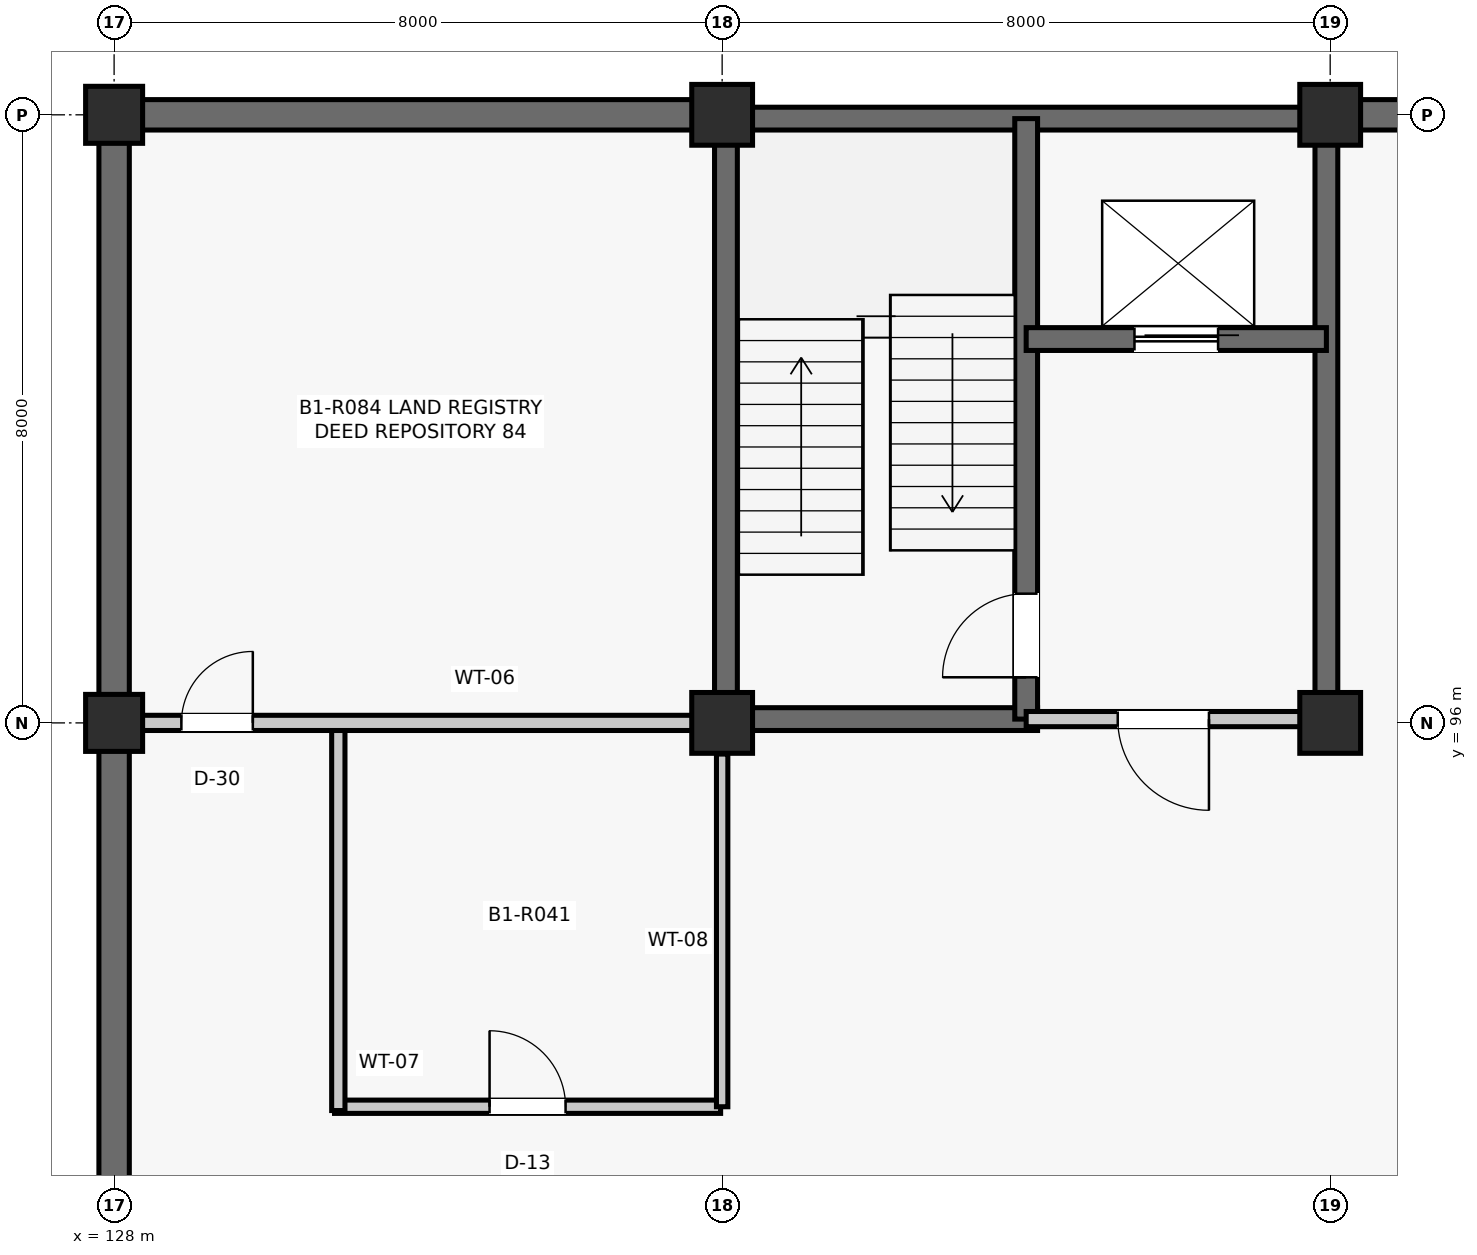
"""IFC4 building model, lengths in metres.
Left out: names, types, materials, properties, quantities, classifications, styles, units other than length and angle.
Written with IfcOpenShell. Run it as: python <this file> out.ifc"""

import sys

from ifc_helpers import new_model, si_unit, direction, frame, frame_2d, origin, origin_2d, place, context, subcontext, project, spatial, rectangle, extrude, element, fill, save


model = new_model("IFC4")
c1 = context("Model", 3, precision=1e-05, world=origin(), true_north=direction((0.0, 1.0)))
c2 = subcontext(c1, "Body", "Model", "MODEL_VIEW")
j1 = project(units=[si_unit("LENGTHUNIT", "METRE"), si_unit("PLANEANGLEUNIT", "RADIAN")], contexts=[c1])
p1 = place(None, origin())
s1 = spatial("IfcSite", under=j1, at=p1, CompositionType="ELEMENT")
p2 = place(p1, origin())
s2 = spatial("IfcBuilding", under=s1, at=p2, CompositionType="ELEMENT")
p3 = place(p2, frame((0.0, 0.0, -4.29)))
s3 = spatial("IfcBuildingStorey", under=s2, at=p3, CompositionType="ELEMENT", Elevation=-4.29)
for number, where, z_axis, x_axis in (
    (1, (128.0, 96.0, 0.0), (0.0, 0.0, 1.0), (1.0, 0.0, 0.0)),
    (2, (128.0, 104.0, 0.0), (0.0, 0.0, 1.0), (1.0, 0.0, 0.0)),
):
    element("IfcColumn", number, at=place(p3, frame(where, z_axis=z_axis, x_axis=x_axis)), inside=s3, PredefinedType="COLUMN", context=c2, shape_type="SweptSolid", body=[
        extrude(rectangle(XDim=0.75, YDim=0.75, at=origin_2d()), origin(), (0.0, 0.0, 1.0), 4.29),
    ])
for number, where, z_axis, x_axis in (
    (3, (136.0, 96.0, 0.0), (0.0, 0.0, 1.0), (1.0, 0.0, 0.0)),
    (4, (136.0, 104.0, 0.0), (0.0, 0.0, 1.0), (1.0, 0.0, 0.0)),
    (5, (144.0, 96.0, 0.0), (0.0, 0.0, 1.0), (1.0, 0.0, 0.0)),
    (6, (144.0, 104.0, 0.0), (0.0, 0.0, 1.0), (1.0, 0.0, 0.0)),
):
    element("IfcColumn", number, at=place(p3, frame(where, z_axis=z_axis, x_axis=x_axis)), inside=s3, PredefinedType="COLUMN", context=c2, shape_type="SweptSolid", body=[
        extrude(rectangle(XDim=0.8, YDim=0.8, at=origin_2d()), origin(), (0.0, 0.0, 1.0), 4.29),
    ])
p4 = place(p3, frame((128.0, 88.36, 0.0), z_axis=(0.0, 0.0, 1.0), x_axis=(0.0, 1.0, 0.0)))
e7 = element("IfcWall", 7, at=p4, inside=s3, PredefinedType="SHEAR", context=c2, shape_type="SweptSolid", body=[
    extrude(rectangle(XDim=7.28, YDim=0.4, at=frame_2d((3.64, 0.0))), origin(), (0.0, 0.0, 1.0), 3.594),
])
p5 = place(p3, frame((128.36, 104.0, 0.0), z_axis=(0.0, 0.0, 1.0), x_axis=(1.0, 0.0, 0.0)))
e8 = element("IfcWall", 8, at=p5, inside=s3, PredefinedType="SHEAR", context=c2, shape_type="SweptSolid", body=[
    extrude(rectangle(XDim=7.255, YDim=0.4, at=frame_2d((3.627, 0.0))), origin(), (0.0, 0.0, 1.0), 3.39),
])
p6 = place(p3, frame((128.0, 96.36, 0.0), z_axis=(0.0, 0.0, 1.0), x_axis=(0.0, 1.0, 0.0)))
e9 = element("IfcWall", 9, at=p6, inside=s3, PredefinedType="SHEAR", context=c2, shape_type="SweptSolid", body=[
    extrude(rectangle(XDim=7.28, YDim=0.4, at=frame_2d((3.64, 0.0))), origin(), (0.0, 0.0, 1.0), 3.657),
])
p7 = place(p3, frame((144.385, 104.0, 0.0), z_axis=(0.0, 0.0, 1.0), x_axis=(1.0, 0.0, 0.0)))
e10 = element("IfcWall", 10, at=p7, inside=s3, PredefinedType="SHEAR", context=c2, shape_type="SweptSolid", body=[
    extrude(rectangle(XDim=7.255, YDim=0.4, at=frame_2d((3.627, 0.0))), origin(), (0.0, 0.0, 1.0), 3.391),
])
for number, where, z_axis, x_axis in (
    (11, (136.05, 96.29, 0.0), (0.0, 0.0, 1.0), (0.0, 1.0, 0.0)),
    (12, (136.29, 103.95, 0.0), (0.0, 0.0, 1.0), (1.0, 0.0, 0.0)),
    (13, (143.95, 96.29, 0.0), (0.0, 0.0, 1.0), (0.0, 1.0, 0.0)),
):
    element("IfcWall", number, at=place(p3, frame(where, z_axis=z_axis, x_axis=x_axis)), inside=s3, PredefinedType="SHEAR", context=c2, shape_type="SweptSolid", body=[
        extrude(rectangle(XDim=7.42, YDim=0.3, at=frame_2d((3.71, 0.0))), origin(), (0.0, 0.0, 1.0), 4.015),
    ])
p8 = place(p3, frame((136.29, 96.05, 0.0), z_axis=(0.0, 0.0, 1.0), x_axis=(1.0, 0.0, 0.0)))
e14 = element("IfcWall", 14, at=p8, inside=s3, PredefinedType="SHEAR", context=c2, shape_type="SweptSolid", body=[
    extrude(rectangle(XDim=3.86, YDim=0.3, at=frame_2d((1.93, 0.0))), origin(), (0.0, 0.0, 1.0), 4.015),
])
p9 = place(p3, frame((140.0, 96.05, 0.0), z_axis=(0.0, 0.0, 1.0), x_axis=(0.0, 1.0, 0.0)))
e15 = element("IfcWall", 15, at=p9, inside=s3, PredefinedType="SHEAR", context=c2, shape_type="SweptSolid", body=[
    extrude(rectangle(XDim=7.9, YDim=0.3, at=frame_2d((3.95, 0.0))), origin(), (0.0, 0.0, 1.0), 4.015),
])
p10 = place(p9, frame((0.55, 0.0, 0.0)))
e16 = element("IfcOpeningElement", 16, at=p10, cuts=e15, PredefinedType="OPENING", context=c2, shape_type="SweptSolid", body=[
    extrude(rectangle(XDim=1.1, YDim=2.15, at=frame_2d((0.55, 1.075))), frame((0.0, 0.16, 0.0), z_axis=(0.0, -1.0, 0.0), x_axis=(1.0, 0.0, 0.0)), (0.0, 0.0, 1.0), 0.32),
])
p11 = place(p3, frame((140.0, 101.05, 0.0), z_axis=(0.0, 0.0, 1.0), x_axis=(1.0, 0.0, 0.0)))
e17 = element("IfcWall", 17, at=p11, inside=s3, PredefinedType="SHEAR", context=c2, shape_type="SweptSolid", body=[
    extrude(rectangle(XDim=3.95, YDim=0.3, at=frame_2d((1.975, 0.0))), origin(), (0.0, 0.0, 1.0), 4.015),
])
p12 = place(p11, frame((1.425, 0.0, 0.0)))
e18 = element("IfcOpeningElement", 18, at=p12, cuts=e17, PredefinedType="OPENING", context=c2, shape_type="SweptSolid", body=[
    extrude(rectangle(XDim=1.1, YDim=2.2, at=frame_2d((0.55, 1.1))), frame((0.0, 0.16, 0.0), z_axis=(0.0, -1.0, 0.0), x_axis=(1.0, 0.0, 0.0)), (0.0, 0.0, 1.0), 0.32),
])
p13 = place(p3, frame((140.0, 96.05, 0.0), z_axis=(0.0, 0.0, 1.0), x_axis=(1.0, 0.0, 0.0)))
e19 = element("IfcWall", 19, at=p13, inside=s3, PredefinedType="PARTITIONING", context=c2, shape_type="SweptSolid", body=[
    extrude(rectangle(XDim=3.61, YDim=0.2, at=frame_2d((1.805, 0.0))), origin(), (0.0, 0.0, 1.0), 3.383),
])
p14 = place(p13, frame((1.205, 0.0, 0.0)))
e20 = element("IfcOpeningElement", 20, at=p14, cuts=e19, PredefinedType="OPENING", context=c2, shape_type="SweptSolid", body=[
    extrude(rectangle(XDim=1.2, YDim=2.15, at=frame_2d((0.6, 1.075))), frame((0.0, 0.11, 0.0), z_axis=(0.0, -1.0, 0.0), x_axis=(1.0, 0.0, 0.0)), (0.0, 0.0, 1.0), 0.22),
])
p15 = place(p3, frame((130.9, 90.95, 0.0), z_axis=(0.0, 0.0, 1.0), x_axis=(1.0, 0.0, 0.0)))
e21 = element("IfcWall", 21, at=p15, inside=s3, PredefinedType="PARTITIONING", context=c2, shape_type="SweptSolid", body=[
    extrude(rectangle(XDim=5.08, YDim=0.175, at=frame_2d((2.54, 0.0))), origin(), (0.0, 0.0, 1.0), 3.383),
])
p16 = place(p15, frame((2.04, 0.0, 0.0)))
e22 = element("IfcOpeningElement", 22, at=p16, cuts=e21, PredefinedType="OPENING", context=c2, shape_type="SweptSolid", body=[
    extrude(rectangle(XDim=1.0, YDim=2.15, at=frame_2d((0.5, 1.075))), frame((0.0, 0.097, 0.0), z_axis=(0.0, -1.0, 0.0), x_axis=(1.0, 0.0, 0.0)), (0.0, 0.0, 1.0), 0.195),
])
p17 = place(p3, frame((130.95, 90.9, 0.0), z_axis=(0.0, 0.0, 1.0), x_axis=(0.0, 1.0, 0.0)))
e23 = element("IfcWall", 23, at=p17, inside=s3, PredefinedType="PARTITIONING", context=c2, shape_type="SweptSolid", body=[
    extrude(rectangle(XDim=5.08, YDim=0.175, at=frame_2d((2.54, 0.0))), origin(), (0.0, 0.0, 1.0), 3.307),
])
p18 = place(p3, frame((136.0, 90.95, 0.0), z_axis=(0.0, 0.0, 1.0), x_axis=(0.0, 1.0, 0.0)))
e24 = element("IfcWall", 24, at=p18, inside=s3, PredefinedType="PARTITIONING", context=c2, shape_type="SweptSolid", body=[
    extrude(rectangle(XDim=4.64, YDim=0.15, at=frame_2d((2.32, 0.0))), origin(), (0.0, 0.0, 1.0), 3.383),
])
p19 = place(p3, frame((128.365, 96.0, 0.0), z_axis=(0.0, 0.0, 1.0), x_axis=(1.0, 0.0, 0.0)))
e25 = element("IfcWall", 25, at=p19, inside=s3, PredefinedType="PARTITIONING", context=c2, shape_type="SweptSolid", body=[
    extrude(rectangle(XDim=7.245, YDim=0.2, at=frame_2d((3.623, 0.0))), origin(), (0.0, 0.0, 1.0), 3.307),
])
p20 = place(p19, frame((0.52, 0.0, 0.0)))
e26 = element("IfcOpeningElement", 26, at=p20, cuts=e25, PredefinedType="OPENING", context=c2, shape_type="SweptSolid", body=[
    extrude(rectangle(XDim=0.94, YDim=2.12, at=frame_2d((0.47, 1.06))), frame((0.0, 0.11, 0.0), z_axis=(0.0, -1.0, 0.0), x_axis=(1.0, 0.0, 0.0)), (0.0, 0.0, 1.0), 0.22),
])
p21 = place(p10, origin())
e27 = element("IfcDoor", 27, at=p21, inside=s3, OperationType="SINGLE_SWING_LEFT", PredefinedType="DOOR", context=c2, shape_type="SweptSolid", body=[
    extrude(rectangle(XDim=1.1, YDim=2.15, at=frame_2d((0.55, 1.075))), frame((0.0, 0.025, 0.0), z_axis=(0.0, -1.0, 0.0), x_axis=(1.0, 0.0, 0.0)), (0.0, 0.0, 1.0), 0.05),
])
fill(e16, e27)
p22 = place(p12, origin())
e28 = element("IfcDoor", 28, at=p22, inside=s3, OperationType="SLIDING_TO_LEFT", PredefinedType="DOOR", context=c2, shape_type="SweptSolid", body=[
    extrude(rectangle(XDim=1.1, YDim=2.2, at=frame_2d((0.55, 1.1))), frame((0.0, 0.025, 0.0), z_axis=(0.0, -1.0, 0.0), x_axis=(1.0, 0.0, 0.0)), (0.0, 0.0, 1.0), 0.05),
])
fill(e18, e28)
p23 = place(p14, frame((1.2, 0.0, 0.0), z_axis=(0.0, 0.0, 1.0), x_axis=(-1.0, 0.0, 0.0)))
e29 = element("IfcDoor", 29, at=p23, inside=s3, OperationType="SINGLE_SWING_RIGHT", PredefinedType="DOOR", context=c2, shape_type="SweptSolid", body=[
    extrude(rectangle(XDim=1.2, YDim=2.15, at=frame_2d((0.6, 1.075))), frame((0.0, 0.025, 0.0), z_axis=(0.0, -1.0, 0.0), x_axis=(1.0, 0.0, 0.0)), (0.0, 0.0, 1.0), 0.05),
])
fill(e20, e29)
p24 = place(p16, origin())
e30 = element("IfcDoor", 30, at=p24, inside=s3, OperationType="SINGLE_SWING_LEFT", PredefinedType="DOOR", context=c2, shape_type="SweptSolid", body=[
    extrude(rectangle(XDim=1.0, YDim=2.15, at=frame_2d((0.5, 1.075))), frame((0.0, 0.025, 0.0), z_axis=(0.0, -1.0, 0.0), x_axis=(1.0, 0.0, 0.0)), (0.0, 0.0, 1.0), 0.05),
])
fill(e22, e30)
p25 = place(p20, origin())
e31 = element("IfcDoor", 31, at=p25, inside=s3, OperationType="SINGLE_SWING_RIGHT", PredefinedType="DOOR", context=c2, shape_type="SweptSolid", body=[
    extrude(rectangle(XDim=0.94, YDim=2.12, at=frame_2d((0.47, 1.06))), frame((0.0, 0.025, 0.0), z_axis=(0.0, -1.0, 0.0), x_axis=(1.0, 0.0, 0.0)), (0.0, 0.0, 1.0), 0.05),
])
fill(e26, e31)
save(model, sys.argv[1])
